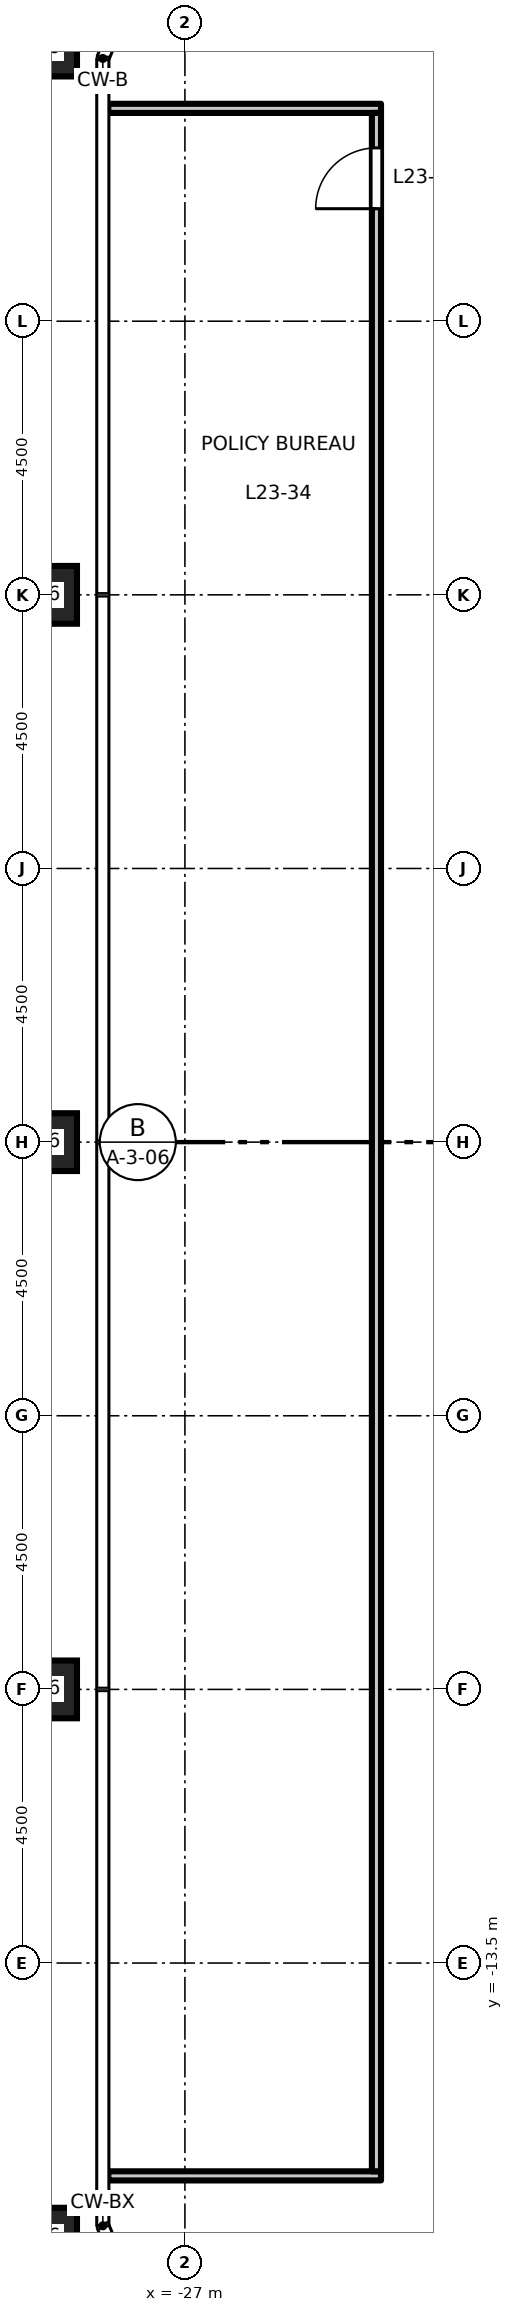
"""IFC4 building model, lengths in metres.
Left out: names, types, materials, properties, quantities, classifications, styles, units other than length and angle.
Written with IfcOpenShell. Run it as: python <this file> out.ifc"""

import sys

from ifc_helpers import new_model, si_unit, direction, frame, frame_2d, origin, origin_2d, place, context, subcontext, project, spatial, rectangle, hollow_rectangle, extrude, element, fill, save


model = new_model("IFC4")
c1 = context("Model", 3, precision=1e-05, world=origin(), true_north=direction((0.0, 1.0)))
c2 = subcontext(c1, "Body", "Model", "MODEL_VIEW")
j1 = project(units=[si_unit("LENGTHUNIT", "METRE"), si_unit("PLANEANGLEUNIT", "RADIAN")], contexts=[c1])
p1 = place(None, origin())
s1 = spatial("IfcSite", under=j1, at=p1, CompositionType="ELEMENT")
p2 = place(p1, origin())
s2 = spatial("IfcBuilding", under=s1, at=p2, CompositionType="ELEMENT")
p3 = place(p2, frame((0.0, 0.0, 109.2)))
s3 = spatial("IfcBuildingStorey", under=s2, at=p3, CompositionType="ELEMENT", Elevation=109.2)
for number, where, z_axis, x_axis in (
    (1, (-29.25, 18.0, 0.0), (0.0, 0.0, 1.0), (1.0, 0.0, 0.0)),
    (2, (-29.25, 9.0, 0.0), (0.0, 0.0, 1.0), (1.0, 0.0, 0.0)),
    (3, (-29.25, 0.0, 0.0), (0.0, 0.0, 1.0), (1.0, 0.0, 0.0)),
    (4, (-29.25, -9.0, 0.0), (0.0, 0.0, 1.0), (1.0, 0.0, 0.0)),
    (5, (-29.25, -18.0, 0.0), (0.0, 0.0, 1.0), (1.0, 0.0, 0.0)),
):
    element("IfcColumn", number, at=place(p3, frame(where, z_axis=z_axis, x_axis=x_axis)), inside=s3, PredefinedType="COLUMN", context=c2, shape_type="SweptSolid", body=[
        extrude(hollow_rectangle(XDim=0.95, YDim=0.95, WallThickness=0.055, at=origin_2d()), origin(), (0.0, 0.0, 1.0), 4.5),
    ])
for number, where, z_axis, x_axis in (
    (6, (-28.26, -17.0, 0.0), (0.0, 0.0, 1.0), (1.0, 0.0, 0.0)),
    (7, (-28.26, 17.0, 0.0), (0.0, 0.0, 1.0), (1.0, 0.0, 0.0)),
):
    element("IfcWall", number, at=place(p3, frame(where, z_axis=z_axis, x_axis=x_axis)), inside=s3, PredefinedType="PARTITIONING", context=c2, shape_type="SweptSolid", body=[
        extrude(rectangle(XDim=4.485, YDim=0.15, at=frame_2d((2.243, 0.0))), origin(), (0.0, 0.0, 1.0), 4.35),
    ])
p4 = place(p3, frame((-23.85, -16.925, 0.0), z_axis=(0.0, 0.0, 1.0), x_axis=(0.0, 1.0, 0.0)))
e8 = element("IfcWall", 8, at=p4, inside=s3, PredefinedType="PARTITIONING", context=c2, shape_type="SweptSolid", body=[
    extrude(rectangle(XDim=33.85, YDim=0.15, at=frame_2d((16.925, 0.0))), origin(), (0.0, 0.0, 1.0), 4.35),
])
p5 = place(p4, frame((32.275, 0.0, 0.0)))
e9 = element("IfcOpeningElement", 9, at=p5, cuts=e8, PredefinedType="OPENING", context=c2, shape_type="SweptSolid", body=[
    extrude(rectangle(XDim=1.0, YDim=2.1, at=frame_2d((0.5, 1.05))), frame((0.0, 0.085, 0.0), z_axis=(0.0, -1.0, 0.0), x_axis=(1.0, 0.0, 0.0)), (0.0, 0.0, 1.0), 0.17),
])
p6 = place(p5, origin())
e10 = element("IfcDoor", 10, at=p6, inside=s3, OperationType="SINGLE_SWING_LEFT", PredefinedType="DOOR", context=c2, shape_type="SweptSolid", body=[
    extrude(rectangle(XDim=1.0, YDim=2.1, at=frame_2d((0.5, 1.05))), frame((0.0, 0.025, 0.0), z_axis=(0.0, -1.0, 0.0), x_axis=(1.0, 0.0, 0.0)), (0.0, 0.0, 1.0), 0.05),
])
fill(e9, e10)
save(model, sys.argv[1])
